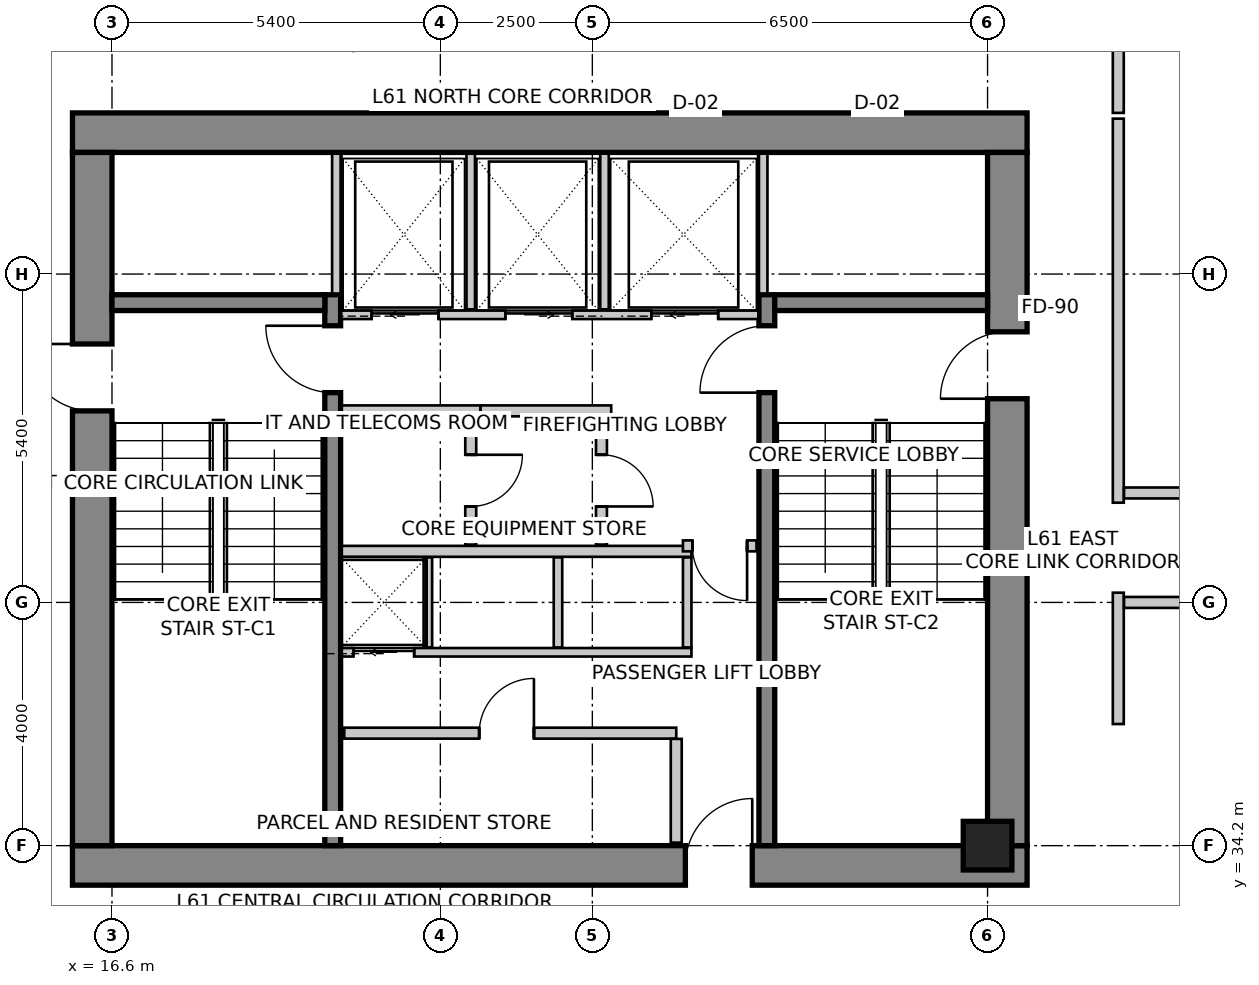
"""IFC4 building model, lengths in metres.
Left out: names, types, materials, properties, quantities, classifications, styles, units other than length and angle.
Written with IfcOpenShell. Run it as: python <this file> out.ifc"""

import sys

from ifc_helpers import new_model, si_unit, direction, frame, frame_2d, origin, origin_2d, place, context, subcontext, project, spatial, rectangle, extrude, source, transform, mapped, element, fill, save


model = new_model("IFC4")
c1 = context("Model", 3, precision=1e-05, world=origin(), true_north=direction((0.0, 1.0)))
c2 = subcontext(c1, "Body", "Model", "MODEL_VIEW")
j1 = project(units=[si_unit("LENGTHUNIT", "METRE"), si_unit("PLANEANGLEUNIT", "RADIAN")], contexts=[c1])
p1 = place(None, origin())
s1 = spatial("IfcSite", under=j1, at=p1, CompositionType="ELEMENT")
p2 = place(p1, origin())
s2 = spatial("IfcBuilding", under=s1, at=p2, CompositionType="ELEMENT")
p3 = place(p2, frame((0.0, 0.0, 239.4)))
s3 = spatial("IfcBuildingStorey", under=s2, at=p3, CompositionType="ELEMENT", Elevation=239.4)
p4 = place(p3, frame((15.95, 45.925, 0.0), z_axis=(0.0, 0.0, 1.0), x_axis=(1.0, 0.0, 0.0)))
e1 = element("IfcWall", 1, at=p4, inside=s3, PredefinedType="SHEAR", context=c2, shape_type="SweptSolid", body=[
    extrude(rectangle(XDim=15.7, YDim=0.65, at=frame_2d((7.85, 0.0))), origin(), (0.0, 0.0, 1.0), 3.5),
])
p5 = place(p3, frame((15.95, 33.875, 0.0), z_axis=(0.0, 0.0, 1.0), x_axis=(1.0, 0.0, 0.0)))
e2 = element("IfcWall", 2, at=p5, inside=s3, PredefinedType="SHEAR", context=c2, shape_type="SweptSolid", body=[
    extrude(rectangle(XDim=15.7, YDim=0.65, at=frame_2d((7.85, 0.0))), origin(), (0.0, 0.0, 1.0), 3.5),
])
m1 = source(origin(), c2, "Body", "SweptSolid", [
    extrude(rectangle(XDim=1.1, YDim=2.15, at=frame_2d((0.55, 1.075))), frame((0.0, 0.335, 0.0), z_axis=(0.0, -1.0, 0.0), x_axis=(1.0, 0.0, 0.0)), (0.0, 0.0, 1.0), 0.67),
])
p6 = place(p5, frame((10.08, 0.0, 0.0)))
e3 = element("IfcOpeningElement", 3, at=p6, cuts=e2, PredefinedType="OPENING", context=c2, shape_type="MappedRepresentation", body=[
    mapped(m1, transform((0.0, 0.0, 0.0), scale=1.0)),
])
p7 = place(p3, frame((16.275, 34.2, 0.0), z_axis=(0.0, 0.0, 1.0), x_axis=(0.0, 1.0, 0.0)))
e4 = element("IfcWall", 4, at=p7, inside=s3, PredefinedType="SHEAR", context=c2, shape_type="SweptSolid", body=[
    extrude(rectangle(XDim=11.4, YDim=0.65, at=frame_2d((5.7, 0.0))), origin(), (0.0, 0.0, 1.0), 3.5),
])
p8 = place(p7, frame((7.15, 0.0, 0.0)))
e5 = element("IfcOpeningElement", 5, at=p8, cuts=e4, PredefinedType="OPENING", context=c2, shape_type="MappedRepresentation", body=[
    mapped(m1, transform((0.0, 0.0, 0.0), scale=1.0)),
])
p9 = place(p3, frame((31.325, 34.2, 0.0), z_axis=(0.0, 0.0, 1.0), x_axis=(0.0, 1.0, 0.0)))
e6 = element("IfcWall", 6, at=p9, inside=s3, PredefinedType="SHEAR", context=c2, shape_type="SweptSolid", body=[
    extrude(rectangle(XDim=11.4, YDim=0.65, at=frame_2d((5.7, 0.0))), origin(), (0.0, 0.0, 1.0), 3.5),
])
p10 = place(p9, frame((7.35, 0.0, 0.0)))
e7 = element("IfcOpeningElement", 7, at=p10, cuts=e6, PredefinedType="OPENING", context=c2, shape_type="MappedRepresentation", body=[
    mapped(m1, transform((0.0, 0.0, 0.0), scale=1.0)),
])
p11 = place(p3, frame((20.23, 34.2, 0.0), z_axis=(0.0, 0.0, 1.0), x_axis=(0.0, 1.0, 0.0)))
e8 = element("IfcWall", 8, at=p11, inside=s3, PredefinedType="SHEAR", context=c2, shape_type="SweptSolid", body=[
    extrude(rectangle(XDim=9.06, YDim=0.26, at=frame_2d((4.53, 0.0))), origin(), (0.0, 0.0, 1.0), 3.5),
])
m2 = source(origin(), c2, "Body", "SweptSolid", [
    extrude(rectangle(XDim=1.1, YDim=2.15, at=frame_2d((0.55, 1.075))), frame((0.0, 0.14, 0.0), z_axis=(0.0, -1.0, 0.0), x_axis=(1.0, 0.0, 0.0)), (0.0, 0.0, 1.0), 0.28),
])
p12 = place(p11, frame((7.45, 0.0, 0.0)))
e9 = element("IfcOpeningElement", 9, at=p12, cuts=e8, PredefinedType="OPENING", context=c2, shape_type="MappedRepresentation", body=[
    mapped(m2, transform((0.0, 0.0, 0.0), scale=1.0)),
])
p13 = place(p3, frame((27.37, 34.2, 0.0), z_axis=(0.0, 0.0, 1.0), x_axis=(0.0, 1.0, 0.0)))
e10 = element("IfcWall", 10, at=p13, inside=s3, PredefinedType="SHEAR", context=c2, shape_type="SweptSolid", body=[
    extrude(rectangle(XDim=9.06, YDim=0.26, at=frame_2d((4.53, 0.0))), origin(), (0.0, 0.0, 1.0), 3.5),
])
p14 = place(p13, frame((7.45, 0.0, 0.0)))
e11 = element("IfcOpeningElement", 11, at=p14, cuts=e10, PredefinedType="OPENING", context=c2, shape_type="MappedRepresentation", body=[
    mapped(m2, transform((0.0, 0.0, 0.0), scale=1.0)),
])
for number, where, z_axis, x_axis in (
    (12, (16.6, 43.13, 0.0), (0.0, 0.0, 1.0), (1.0, 0.0, 0.0)),
    (13, (27.5, 43.13, 0.0), (0.0, 0.0, 1.0), (1.0, 0.0, 0.0)),
):
    element("IfcWall", number, at=place(p3, frame(where, z_axis=z_axis, x_axis=x_axis)), inside=s3, PredefinedType="SHEAR", context=c2, shape_type="SweptSolid", body=[
        extrude(rectangle(XDim=3.5, YDim=0.26, at=frame_2d((1.75, 0.0))), origin(), (0.0, 0.0, 1.0), 3.5),
    ])
m3 = source(origin(), c2, "Body", "SweptSolid", [
    extrude(rectangle(XDim=0.8, YDim=0.8, at=origin_2d()), origin(), (0.0, 0.0, 1.0), 3.5),
])
p15 = place(p3, frame((31.0, 34.2, 0.0), z_axis=(0.0, 0.0, 1.0), x_axis=(1.0, 0.0, 0.0)))
e14 = element("IfcColumn", 14, at=p15, inside=s3, PredefinedType="COLUMN", context=c2, shape_type="MappedRepresentation", body=[
    mapped(m3, transform((0.0, 0.0, 0.0), scale=1.0)),
])
p16 = place(p3, frame((21.874, 52.742, 0.0), z_axis=(0.0, 0.0, 1.0), x_axis=(-0.84365659959, -0.536883173482, 0.0)))
e15 = element("IfcWall", 15, at=p16, inside=s3, PredefinedType="SOLIDWALL", context=c2, shape_type="SweptSolid", body=[
    extrude(rectangle(XDim=10.283, YDim=0.3, at=frame_2d((5.142, 0.0))), origin(), (0.0, 0.0, 1.0), 3.2),
])
m4 = source(origin(), c2, "Body", "SweptSolid", [
    extrude(rectangle(XDim=2.4, YDim=2.2, at=frame_2d((1.2, 1.1))), frame((0.0, 0.16, 0.0), z_axis=(0.0, -1.0, 0.0), x_axis=(1.0, 0.0, 0.0)), (0.0, 0.0, 1.0), 0.32),
])
p17 = place(p16, frame((3.307, 0.0, 0.85)))
e16 = element("IfcOpeningElement", 16, at=p17, cuts=e15, PredefinedType="OPENING", context=c2, shape_type="MappedRepresentation", body=[
    mapped(m4, transform((0.0, 0.0, 0.0), scale=1.0)),
])
p18 = place(p3, frame((20.37, 42.93, 0.0), z_axis=(0.0, 0.0, 1.0), x_axis=(1.0, 0.0, 0.0)))
e17 = element("IfcWall", 17, at=p18, inside=s3, PredefinedType="SOLIDWALL", context=c2, shape_type="SweptSolid", body=[
    extrude(rectangle(XDim=6.86, YDim=0.14, at=frame_2d((3.43, 0.0))), origin(), (0.0, 0.0, 1.0), 3.2),
])
m5 = source(origin(), c2, "Body", "SweptSolid", [
    extrude(rectangle(XDim=1.1, YDim=2.15, at=frame_2d((0.55, 1.075))), frame((0.0, 0.08, 0.0), z_axis=(0.0, -1.0, 0.0), x_axis=(1.0, 0.0, 0.0)), (0.0, 0.0, 1.0), 0.16),
])
p19 = place(p18, frame((0.5, 0.0, 0.0)))
e18 = element("IfcOpeningElement", 18, at=p19, cuts=e17, PredefinedType="OPENING", context=c2, shape_type="MappedRepresentation", body=[
    mapped(m5, transform((0.0, 0.0, 0.0), scale=1.0)),
])
p20 = place(p18, frame((2.7, 0.0, 0.0)))
e19 = element("IfcOpeningElement", 19, at=p20, cuts=e17, PredefinedType="OPENING", context=c2, shape_type="MappedRepresentation", body=[
    mapped(m5, transform((0.0, 0.0, 0.0), scale=1.0)),
])
p21 = place(p18, frame((5.1, 0.0, 0.0)))
e20 = element("IfcOpeningElement", 20, at=p21, cuts=e17, PredefinedType="OPENING", context=c2, shape_type="MappedRepresentation", body=[
    mapped(m5, transform((0.0, 0.0, 0.0), scale=1.0)),
])
for number, where, z_axis, x_axis in (
    (21, (20.29, 43.28, 0.0), (0.0, 0.0, 1.0), (0.0, 1.0, 0.0)),
    (22, (27.31, 43.28, 0.0), (0.0, 0.0, 1.0), (0.0, 1.0, 0.0)),
):
    element("IfcWall", number, at=place(p3, frame(where, z_axis=z_axis, x_axis=x_axis)), inside=s3, PredefinedType="SOLIDWALL", context=c2, shape_type="SweptSolid", body=[
        extrude(rectangle(XDim=2.3, YDim=0.14, at=frame_2d((1.15, 0.0))), origin(), (0.0, 0.0, 1.0), 3.2),
    ])
for number, where, z_axis, x_axis in (
    (23, (22.5, 43.02, 0.0), (0.0, 0.0, 1.0), (0.0, 1.0, 0.0)),
    (24, (24.7, 43.02, 0.0), (0.0, 0.0, 1.0), (0.0, 1.0, 0.0)),
):
    element("IfcWall", number, at=place(p3, frame(where, z_axis=z_axis, x_axis=x_axis)), inside=s3, PredefinedType="SOLIDWALL", context=c2, shape_type="SweptSolid", body=[
        extrude(rectangle(XDim=2.56, YDim=0.14, at=frame_2d((1.28, 0.0))), origin(), (0.0, 0.0, 1.0), 3.2),
    ])
p22 = place(p3, frame((20.38, 37.38, 0.0), z_axis=(0.0, 0.0, 1.0), x_axis=(1.0, 0.0, 0.0)))
e25 = element("IfcWall", 25, at=p22, inside=s3, PredefinedType="SOLIDWALL", context=c2, shape_type="SweptSolid", body=[
    extrude(rectangle(XDim=5.75, YDim=0.14, at=frame_2d((2.875, 0.0))), origin(), (0.0, 0.0, 1.0), 3.2),
])
m6 = source(origin(), c2, "Body", "SweptSolid", [
    extrude(rectangle(XDim=1.0, YDim=2.15, at=frame_2d((0.5, 1.075))), frame((0.0, 0.08, 0.0), z_axis=(0.0, -1.0, 0.0), x_axis=(1.0, 0.0, 0.0)), (0.0, 0.0, 1.0), 0.16),
])
p23 = place(p22, frame((0.19, 0.0, 0.0)))
e26 = element("IfcOpeningElement", 26, at=p23, cuts=e25, PredefinedType="OPENING", context=c2, shape_type="MappedRepresentation", body=[
    mapped(m6, transform((0.0, 0.0, 0.0), scale=1.0)),
])
p24 = place(p3, frame((20.38, 39.04, 0.0), z_axis=(0.0, 0.0, 1.0), x_axis=(1.0, 0.0, 0.0)))
e27 = element("IfcWall", 27, at=p24, inside=s3, PredefinedType="SOLIDWALL", context=c2, shape_type="SweptSolid", body=[
    extrude(rectangle(XDim=5.75, YDim=0.18, at=frame_2d((2.875, 0.0))), origin(), (0.0, 0.0, 1.0), 3.2),
])
for number, where, z_axis, x_axis in (
    (28, (26.06, 37.46, 0.0), (0.0, 0.0, 1.0), (0.0, 1.0, 0.0)),
    (29, (21.795, 37.46, 0.0), (0.0, 0.0, 1.0), (0.0, 1.0, 0.0)),
    (30, (23.935, 37.46, 0.0), (0.0, 0.0, 1.0), (0.0, 1.0, 0.0)),
):
    element("IfcWall", number, at=place(p3, frame(where, z_axis=z_axis, x_axis=x_axis)), inside=s3, PredefinedType="SOLIDWALL", context=c2, shape_type="SweptSolid", body=[
        extrude(rectangle(XDim=1.48, YDim=0.14, at=frame_2d((0.74, 0.0))), origin(), (0.0, 0.0, 1.0), 3.2),
    ])
p25 = place(p3, frame((22.66, 41.35, 0.0), z_axis=(0.0, 0.0, 1.0), x_axis=(-1.0, 0.0, 0.0)))
e31 = element("IfcWall", 31, at=p25, inside=s3, PredefinedType="PARTITIONING", context=c2, shape_type="SweptSolid", body=[
    extrude(rectangle(XDim=2.28, YDim=0.18, at=frame_2d((1.14, 0.0))), origin(), (0.0, 0.0, 1.0), 3.2),
])
p26 = place(p3, frame((24.81, 41.35, 0.0), z_axis=(0.0, 0.0, 1.0), x_axis=(-1.0, 0.0, 0.0)))
e32 = element("IfcWall", 32, at=p26, inside=s3, PredefinedType="PARTITIONING", context=c2, shape_type="SweptSolid", body=[
    extrude(rectangle(XDim=2.148, YDim=0.18, at=frame_2d((1.074, 0.0))), origin(), (0.0, 0.0, 1.0), 3.2),
])
p27 = place(p3, frame((22.5, 41.256, 0.0), z_axis=(0.0, 0.0, 1.0), x_axis=(0.0, -1.0, 0.0)))
e33 = element("IfcWall", 33, at=p27, inside=s3, PredefinedType="PARTITIONING", context=c2, shape_type="SweptSolid", body=[
    extrude(rectangle(XDim=2.106, YDim=0.18, at=frame_2d((1.053, 0.0))), origin(), (0.0, 0.0, 1.0), 3.2),
])
m7 = source(origin(), c2, "Body", "SweptSolid", [
    extrude(rectangle(XDim=0.85, YDim=2.15, at=frame_2d((0.425, 1.075))), frame((0.0, 0.1, 0.0), z_axis=(0.0, -1.0, 0.0), x_axis=(1.0, 0.0, 0.0)), (0.0, 0.0, 1.0), 0.2),
])
p28 = place(p27, frame((0.628, 0.0, 0.0)))
e34 = element("IfcOpeningElement", 34, at=p28, cuts=e33, PredefinedType="OPENING", context=c2, shape_type="MappedRepresentation", body=[
    mapped(m7, transform((0.0, 0.0, 0.0), scale=1.0)),
])
p29 = place(p3, frame((24.65, 41.256, 0.0), z_axis=(0.0, 0.0, 1.0), x_axis=(0.0, -1.0, 0.0)))
e35 = element("IfcWall", 35, at=p29, inside=s3, PredefinedType="PARTITIONING", context=c2, shape_type="SweptSolid", body=[
    extrude(rectangle(XDim=2.106, YDim=0.18, at=frame_2d((1.053, 0.0))), origin(), (0.0, 0.0, 1.0), 3.2),
])
p30 = place(p29, frame((0.628, 0.0, 0.0)))
e36 = element("IfcOpeningElement", 36, at=p30, cuts=e35, PredefinedType="OPENING", context=c2, shape_type="MappedRepresentation", body=[
    mapped(m7, transform((0.0, 0.0, 0.0), scale=1.0)),
])
p31 = place(p3, frame((27.2, 39.13, 0.0), z_axis=(0.0, 0.0, 1.0), x_axis=(-1.0, 0.0, 0.0)))
e37 = element("IfcWall", 37, at=p31, inside=s3, PredefinedType="PARTITIONING", context=c2, shape_type="SweptSolid", body=[
    extrude(rectangle(XDim=1.21, YDim=0.18, at=frame_2d((0.605, 0.0))), origin(), (0.0, 0.0, 1.0), 3.2),
])
m8 = source(origin(), c2, "Body", "SweptSolid", [
    extrude(rectangle(XDim=0.9, YDim=2.15, at=frame_2d((0.45, 1.075))), frame((0.0, 0.1, 0.0), z_axis=(0.0, -1.0, 0.0), x_axis=(1.0, 0.0, 0.0)), (0.0, 0.0, 1.0), 0.2),
])
p32 = place(p31, frame((0.155, 0.0, 0.0)))
e38 = element("IfcOpeningElement", 38, at=p32, cuts=e37, PredefinedType="OPENING", context=c2, shape_type="MappedRepresentation", body=[
    mapped(m8, transform((0.0, 0.0, 0.0), scale=1.0)),
])
p33 = place(p3, frame((20.42, 36.05, 0.0), z_axis=(0.0, 0.0, 1.0), x_axis=(1.0, 0.0, 0.0)))
e39 = element("IfcWall", 39, at=p33, inside=s3, PredefinedType="PARTITIONING", context=c2, shape_type="SweptSolid", body=[
    extrude(rectangle(XDim=5.46, YDim=0.18, at=frame_2d((2.73, 0.0))), origin(), (0.0, 0.0, 1.0), 3.2),
])
p34 = place(p33, frame((2.219, 0.0, 0.0)))
e40 = element("IfcOpeningElement", 40, at=p34, cuts=e39, PredefinedType="OPENING", context=c2, shape_type="MappedRepresentation", body=[
    mapped(m8, transform((0.0, 0.0, 0.0), scale=1.0)),
])
p35 = place(p3, frame((25.88, 35.956, 0.0), z_axis=(0.0, 0.0, 1.0), x_axis=(0.0, -1.0, 0.0)))
e41 = element("IfcWall", 41, at=p35, inside=s3, PredefinedType="PARTITIONING", context=c2, shape_type="SweptSolid", body=[
    extrude(rectangle(XDim=1.706, YDim=0.18, at=frame_2d((0.853, 0.0))), origin(), (0.0, 0.0, 1.0), 2.492),
])
p36 = place(p3, frame((33.15, 47.706, 0.0), z_axis=(0.0, 0.0, 1.0), x_axis=(0.0, -1.0, 0.0)))
e42 = element("IfcWall", 42, at=p36, inside=s3, PredefinedType="PARTITIONING", context=c2, shape_type="SweptSolid", body=[
    extrude(rectangle(XDim=1.456, YDim=0.18, at=frame_2d((0.728, 0.0))), origin(), (0.0, 0.0, 1.0), 2.869),
])
p37 = place(p3, frame((33.15, 46.156, 0.0), z_axis=(0.0, 0.0, 1.0), x_axis=(0.0, -1.0, 0.0)))
e43 = element("IfcWall", 43, at=p37, inside=s3, PredefinedType="PARTITIONING", context=c2, shape_type="SweptSolid", body=[
    extrude(rectangle(XDim=6.316, YDim=0.18, at=frame_2d((3.158, 0.0))), origin(), (0.0, 0.0, 1.0), 2.729),
])
p38 = place(p3, frame((33.15, 38.36, 0.0), z_axis=(0.0, 0.0, 1.0), x_axis=(0.0, -1.0, 0.0)))
e44 = element("IfcWall", 44, at=p38, inside=s3, PredefinedType="PARTITIONING", context=c2, shape_type="SweptSolid", body=[
    extrude(rectangle(XDim=2.16, YDim=0.18, at=frame_2d((1.08, 0.0))), origin(), (0.0, 0.0, 1.0), 3.2),
])
p39 = place(p3, frame((33.244, 40.0, 0.0), z_axis=(0.0, 0.0, 1.0), x_axis=(1.0, 0.0, 0.0)))
e45 = element("IfcWall", 45, at=p39, inside=s3, PredefinedType="PARTITIONING", context=c2, shape_type="SweptSolid", body=[
    extrude(rectangle(XDim=8.091, YDim=0.18, at=frame_2d((4.045, 0.0))), origin(), (0.0, 0.0, 1.0), 2.716),
])
m9 = source(origin(), c2, "Body", "SweptSolid", [
    extrude(rectangle(XDim=1.4, YDim=2.15, at=frame_2d((0.7, 1.075))), frame((0.0, 0.1, 0.0), z_axis=(0.0, -1.0, 0.0), x_axis=(1.0, 0.0, 0.0)), (0.0, 0.0, 1.0), 0.2),
])
p40 = place(p39, frame((2.804, 0.0, 0.0)))
e46 = element("IfcOpeningElement", 46, at=p40, cuts=e45, PredefinedType="OPENING", context=c2, shape_type="MappedRepresentation", body=[
    mapped(m9, transform((0.0, 0.0, 0.0), scale=1.0)),
])
p41 = place(p3, frame((41.335, 38.2, 0.0), z_axis=(0.0, 0.0, 1.0), x_axis=(-1.0, 0.0, 0.0)))
e47 = element("IfcWall", 47, at=p41, inside=s3, PredefinedType="PARTITIONING", context=c2, shape_type="SweptSolid", body=[
    extrude(rectangle(XDim=8.091, YDim=0.18, at=frame_2d((4.045, 0.0))), origin(), (0.0, 0.0, 1.0), 2.716),
])
p42 = place(p41, frame((3.656, 0.0, 0.0)))
e48 = element("IfcOpeningElement", 48, at=p42, cuts=e47, PredefinedType="OPENING", context=c2, shape_type="MappedRepresentation", body=[
    mapped(m8, transform((0.0, 0.0, 0.0), scale=1.0)),
])
m10 = source(origin(), c2, "Body", "SweptSolid", [
    extrude(rectangle(XDim=1.1, YDim=2.15, at=frame_2d((0.55, 1.075))), frame((0.0, 0.025, 0.0), z_axis=(0.0, -1.0, 0.0), x_axis=(1.0, 0.0, 0.0)), (0.0, 0.0, 1.0), 0.05),
])
p43 = place(p19, origin())
e49 = element("IfcDoor", 49, at=p43, inside=s3, OperationType="SLIDING_TO_LEFT", PredefinedType="DOOR", context=c2, shape_type="MappedRepresentation", body=[
    mapped(m10, transform((0.0, 0.0, 0.0), scale=1.0)),
])
fill(e18, e49)
p44 = place(p20, origin())
e50 = element("IfcDoor", 50, at=p44, inside=s3, OperationType="SLIDING_TO_RIGHT", PredefinedType="DOOR", context=c2, shape_type="MappedRepresentation", body=[
    mapped(m10, transform((0.0, 0.0, 0.0), scale=1.0)),
])
fill(e19, e50)
m11 = source(origin(), c2, "Body", "SweptSolid", [
    extrude(rectangle(XDim=1.1, YDim=2.15, at=frame_2d((0.55, 1.075))), frame((0.0, 0.025, 0.0), z_axis=(0.0, -1.0, 0.0), x_axis=(1.0, 0.0, 0.0)), (0.0, 0.0, 1.0), 0.05),
])
p45 = place(p21, origin())
e51 = element("IfcDoor", 51, at=p45, inside=s3, OperationType="SLIDING_TO_LEFT", PredefinedType="DOOR", context=c2, shape_type="MappedRepresentation", body=[
    mapped(m11, transform((0.0, 0.0, 0.0), scale=1.0)),
])
fill(e20, e51)
m12 = source(origin(), c2, "Body", "SweptSolid", [
    extrude(rectangle(XDim=1.0, YDim=2.15, at=frame_2d((0.5, 1.075))), frame((0.0, 0.025, 0.0), z_axis=(0.0, -1.0, 0.0), x_axis=(1.0, 0.0, 0.0)), (0.0, 0.0, 1.0), 0.05),
])
p46 = place(p23, origin())
e52 = element("IfcDoor", 52, at=p46, inside=s3, OperationType="SLIDING_TO_LEFT", PredefinedType="DOOR", context=c2, shape_type="MappedRepresentation", body=[
    mapped(m12, transform((0.0, 0.0, 0.0), scale=1.0)),
])
fill(e26, e52)
m13 = source(origin(), c2, "Body", "SweptSolid", [
    extrude(rectangle(XDim=1.1, YDim=2.15, at=frame_2d((0.55, 1.075))), frame((0.0, 0.025, 0.0), z_axis=(0.0, -1.0, 0.0), x_axis=(1.0, 0.0, 0.0)), (0.0, 0.0, 1.0), 0.05),
])
p47 = place(p12, origin())
e53 = element("IfcDoor", 53, at=p47, inside=s3, OperationType="SINGLE_SWING_RIGHT", PredefinedType="DOOR", context=c2, shape_type="MappedRepresentation", body=[
    mapped(m13, transform((0.0, 0.0, 0.0), scale=1.0)),
])
fill(e9, e53)
p48 = place(p14, origin())
e54 = element("IfcDoor", 54, at=p48, inside=s3, OperationType="SINGLE_SWING_LEFT", PredefinedType="DOOR", context=c2, shape_type="MappedRepresentation", body=[
    mapped(m13, transform((0.0, 0.0, 0.0), scale=1.0)),
])
fill(e11, e54)
p49 = place(p8, origin())
e55 = element("IfcDoor", 55, at=p49, inside=s3, OperationType="SINGLE_SWING_RIGHT", PredefinedType="DOOR", context=c2, shape_type="MappedRepresentation", body=[
    mapped(m13, transform((0.0, 0.0, 0.0), scale=1.0)),
])
fill(e5, e55)
p50 = place(p10, origin())
e56 = element("IfcDoor", 56, at=p50, inside=s3, OperationType="SINGLE_SWING_LEFT", PredefinedType="DOOR", context=c2, shape_type="MappedRepresentation", body=[
    mapped(m13, transform((0.0, 0.0, 0.0), scale=1.0)),
])
fill(e7, e56)
p51 = place(p6, origin())
e57 = element("IfcDoor", 57, at=p51, inside=s3, OperationType="SINGLE_SWING_RIGHT", PredefinedType="DOOR", context=c2, shape_type="MappedRepresentation", body=[
    mapped(m13, transform((0.0, 0.0, 0.0), scale=1.0)),
])
fill(e3, e57)
m14 = source(origin(), c2, "Body", "SweptSolid", [
    extrude(rectangle(XDim=0.85, YDim=2.15, at=frame_2d((0.425, 1.075))), frame((0.0, 0.025, 0.0), z_axis=(0.0, -1.0, 0.0), x_axis=(1.0, 0.0, 0.0)), (0.0, 0.0, 1.0), 0.05),
])
p52 = place(p28, origin())
e58 = element("IfcDoor", 58, at=p52, inside=s3, OperationType="SINGLE_SWING_LEFT", PredefinedType="DOOR", context=c2, shape_type="MappedRepresentation", body=[
    mapped(m14, transform((0.0, 0.0, 0.0), scale=1.0)),
])
fill(e34, e58)
p53 = place(p30, origin())
e59 = element("IfcDoor", 59, at=p53, inside=s3, OperationType="SINGLE_SWING_RIGHT", PredefinedType="DOOR", context=c2, shape_type="MappedRepresentation", body=[
    mapped(m14, transform((0.0, 0.0, 0.0), scale=1.0)),
])
fill(e36, e59)
m15 = source(origin(), c2, "Body", "SweptSolid", [
    extrude(rectangle(XDim=0.9, YDim=2.15, at=frame_2d((0.45, 1.075))), frame((0.0, 0.025, 0.0), z_axis=(0.0, -1.0, 0.0), x_axis=(1.0, 0.0, 0.0)), (0.0, 0.0, 1.0), 0.05),
])
p54 = place(p32, origin())
e60 = element("IfcDoor", 60, at=p54, inside=s3, OperationType="SINGLE_SWING_LEFT", PredefinedType="DOOR", context=c2, shape_type="MappedRepresentation", body=[
    mapped(m15, transform((0.0, 0.0, 0.0), scale=1.0)),
])
fill(e38, e60)
p55 = place(p34, origin())
e61 = element("IfcDoor", 61, at=p55, inside=s3, OperationType="SINGLE_SWING_RIGHT", PredefinedType="DOOR", context=c2, shape_type="MappedRepresentation", body=[
    mapped(m15, transform((0.0, 0.0, 0.0), scale=1.0)),
])
fill(e40, e61)
save(model, sys.argv[1])
